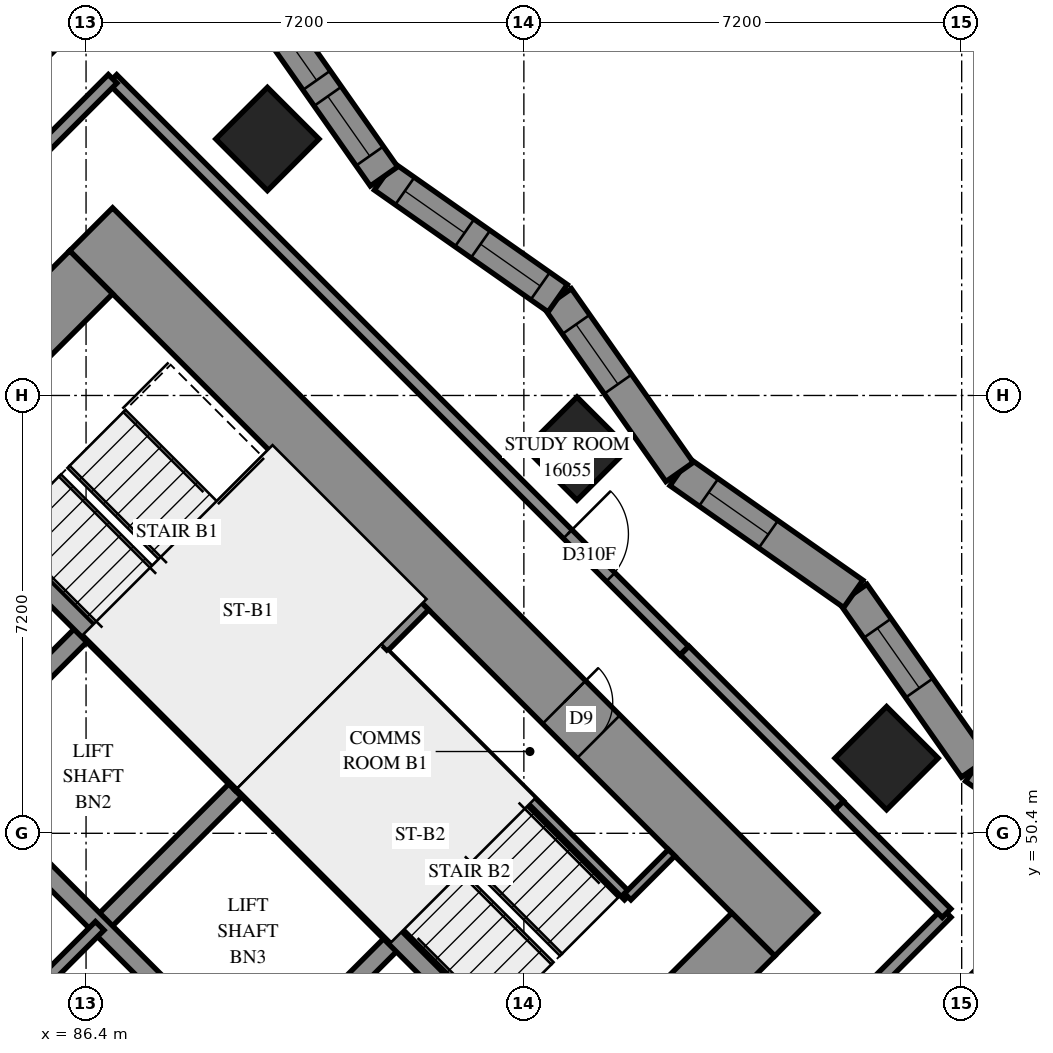
"""IFC4 building model, lengths in metres.
Left out: names, types, materials, properties, quantities, classifications, styles, units other than length and angle.
Written with IfcOpenShell. Run it as: python <this file> out.ifc"""

import sys

from ifc_helpers import new_model, si_unit, direction, frame, frame_2d, origin, origin_2d, place, context, subcontext, project, spatial, polyline, rectangle, outline, extrude, element, fill, save


model = new_model("IFC4")
c1 = context("Model", 3, precision=1e-05, world=origin(), true_north=direction((0.0, 1.0)))
c2 = subcontext(c1, "Body", "Model", "MODEL_VIEW")
j1 = project(units=[si_unit("LENGTHUNIT", "METRE"), si_unit("PLANEANGLEUNIT", "RADIAN")], contexts=[c1])
p1 = place(None, origin())
s1 = spatial("IfcSite", under=j1, at=p1, CompositionType="ELEMENT")
p2 = place(p1, origin())
s2 = spatial("IfcBuilding", under=s1, at=p2, CompositionType="ELEMENT")
p3 = place(p2, frame((0.0, 0.0, 61.0)))
s3 = spatial("IfcBuildingStorey", under=s2, at=p3, CompositionType="ELEMENT", Elevation=61.0)
for number, where, z_axis, x_axis in (
    (1, (89.382, 61.818, 0.0), (0.0, 0.0, 1.0), (0.707, -0.707, 0.0)),
    (2, (94.474, 56.727, 0.0), (0.0, 0.0, 1.0), (0.707, -0.707, 0.0)),
    (3, (99.565, 51.635, 0.0), (0.0, 0.0, 1.0), (0.707, -0.707, 0.0)),
):
    element("IfcColumn", number, at=place(p3, frame(where, z_axis=z_axis, x_axis=x_axis)), inside=s3, PredefinedType="COLUMN", context=c2, shape_type="SweptSolid", body=[
        extrude(rectangle(XDim=1.2, YDim=1.2, at=origin_2d()), origin(), (0.0, 0.0, 1.0), 3.1),
    ])
p4 = place(p3, frame((75.594, 49.443, -0.3), z_axis=(0.0, 0.0, 1.0), x_axis=(0.7071037324, -0.70710983, 0.0)))
e4 = element("IfcWall", 4, at=p4, inside=s3, PredefinedType="SHEAR", context=c2, shape_type="SweptSolid", body=[
    extrude(rectangle(XDim=16.4, YDim=1.0, at=frame_2d((8.2, 0.0))), origin(), (0.0, 0.0, 1.0), 2.7),
])
p5 = place(p3, frame((86.483, 60.333, -0.3), z_axis=(0.0, 0.0, 1.0), x_axis=(0.70710983, -0.7071037324, 0.0)))
e5 = element("IfcWall", 5, at=p5, inside=s3, PredefinedType="SHEAR", context=c2, shape_type="SweptSolid", body=[
    extrude(rectangle(XDim=16.4, YDim=1.0, at=frame_2d((8.2, 0.0))), origin(), (0.0, 0.0, 1.0), 2.7),
])
p6 = place(p5, frame((11.0, 0.0, 0.3)))
e6 = element("IfcOpeningElement", 6, at=p6, cuts=e5, PredefinedType="OPENING", context=c2, shape_type="SweptSolid", body=[
    extrude(rectangle(XDim=0.8, YDim=2.1, at=frame_2d((0.4, 1.05))), frame((0.0, 0.51, 0.0), z_axis=(0.0, -1.0, 0.0), x_axis=(1.0, 0.0, 0.0)), (0.0, 0.0, 1.0), 1.02),
])
p7 = place(p3, frame((76.301, 49.443, -0.3), z_axis=(0.0, 0.0, 1.0), x_axis=(0.7071067812, 0.7071067812, 0.0)))
e7 = element("IfcWall", 7, at=p7, inside=s3, PredefinedType="SHEAR", context=c2, shape_type="SweptSolid", body=[
    extrude(rectangle(XDim=14.4, YDim=1.0, at=frame_2d((7.2, 0.0))), origin(), (0.0, 0.0, 1.0), 2.7),
])
p8 = place(p7, frame((4.55, 0.0, 0.3)))
e8 = element("IfcOpeningElement", 8, at=p8, cuts=e7, PredefinedType="OPENING", context=c2, shape_type="SweptSolid", body=[
    extrude(rectangle(XDim=1.1, YDim=2.1, at=frame_2d((0.55, 1.05))), frame((0.0, 0.51, 0.0), z_axis=(0.0, -1.0, 0.0), x_axis=(1.0, 0.0, 0.0)), (0.0, 0.0, 1.0), 1.02),
])
p9 = place(p7, frame((11.35, 0.0, 0.3)))
e9 = element("IfcOpeningElement", 9, at=p9, cuts=e7, PredefinedType="OPENING", context=c2, shape_type="SweptSolid", body=[
    extrude(rectangle(XDim=1.1, YDim=2.1, at=frame_2d((0.55, 1.05))), frame((0.0, 0.51, 0.0), z_axis=(0.0, -1.0, 0.0), x_axis=(1.0, 0.0, 0.0)), (0.0, 0.0, 1.0), 1.02),
])
p10 = place(p3, frame((87.19, 38.554, -0.3), z_axis=(0.0, 0.0, 1.0), x_axis=(0.707103309, 0.7071102534, 0.0)))
e10 = element("IfcWall", 10, at=p10, inside=s3, PredefinedType="SHEAR", context=c2, shape_type="SweptSolid", body=[
    extrude(rectangle(XDim=14.4, YDim=1.0, at=frame_2d((7.2, 0.0))), origin(), (0.0, 0.0, 1.0), 2.7),
])
p11 = place(p10, frame((4.55, 0.0, 0.3)))
e11 = element("IfcOpeningElement", 11, at=p11, cuts=e10, PredefinedType="OPENING", context=c2, shape_type="SweptSolid", body=[
    extrude(rectangle(XDim=1.1, YDim=2.1, at=frame_2d((0.55, 1.05))), frame((0.0, 0.51, 0.0), z_axis=(0.0, -1.0, 0.0), x_axis=(1.0, 0.0, 0.0)), (0.0, 0.0, 1.0), 1.02),
])
p12 = place(p10, frame((11.35, 0.0, 0.3)))
e12 = element("IfcOpeningElement", 12, at=p12, cuts=e10, PredefinedType="OPENING", context=c2, shape_type="SweptSolid", body=[
    extrude(rectangle(XDim=1.1, YDim=2.1, at=frame_2d((0.55, 1.05))), frame((0.0, 0.51, 0.0), z_axis=(0.0, -1.0, 0.0), x_axis=(1.0, 0.0, 0.0)), (0.0, 0.0, 1.0), 1.02),
])
p13 = place(p3, frame((84.079, 51.423, 0.0), z_axis=(0.0, 0.0, 1.0), x_axis=(0.7071219326, 0.7070916295, 0.0)))
e13 = element("IfcWall", 13, at=p13, inside=s3, PredefinedType="SOLIDWALL", context=c2, shape_type="SweptSolid", body=[
    extrude(rectangle(XDim=3.3, YDim=0.3, at=frame_2d((1.65, 0.0))), origin(), (0.0, 0.0, 1.0), 3.1),
])
for number, where, z_axis, x_axis in (
    (14, (86.625, 48.878, 0.0), (0.0, 0.0, 1.0), (0.707, 0.707, 0.0)),
    (15, (89.17, 46.332, 0.0), (0.0, 0.0, 1.0), (0.707, 0.707, 0.0)),
):
    element("IfcWall", number, at=place(p3, frame(where, z_axis=z_axis, x_axis=x_axis)), inside=s3, PredefinedType="SOLIDWALL", context=c2, shape_type="SweptSolid", body=[
        extrude(rectangle(XDim=3.3, YDim=0.3, at=frame_2d((1.65, 0.0))), origin(), (0.0, 0.0, 1.0), 3.1),
    ])
p14 = place(p3, frame((78.988, 51.423, 0.0), z_axis=(0.0, 0.0, 1.0), x_axis=(0.7071067812, -0.7071067812, 0.0)))
e16 = element("IfcWall", 16, at=p14, inside=s3, PredefinedType="SOLIDWALL", context=c2, shape_type="SweptSolid", body=[
    extrude(rectangle(XDim=14.4, YDim=0.3, at=frame_2d((7.2, 0.0))), origin(), (0.0, 0.0, 1.0), 3.1),
])
p15 = place(p14, frame((1.25, 0.0, 0.0)))
e17 = element("IfcOpeningElement", 17, at=p15, cuts=e16, PredefinedType="OPENING", context=c2, shape_type="SweptSolid", body=[
    extrude(rectangle(XDim=1.1, YDim=2.1, at=frame_2d((0.55, 1.05))), frame((0.0, 0.16, 0.0), z_axis=(0.0, -1.0, 0.0), x_axis=(1.0, 0.0, 0.0)), (0.0, 0.0, 1.0), 0.32),
])
p16 = place(p14, frame((4.85, 0.0, 0.0)))
e18 = element("IfcOpeningElement", 18, at=p16, cuts=e16, PredefinedType="OPENING", context=c2, shape_type="SweptSolid", body=[
    extrude(rectangle(XDim=1.1, YDim=2.1, at=frame_2d((0.55, 1.05))), frame((0.0, 0.16, 0.0), z_axis=(0.0, -1.0, 0.0), x_axis=(1.0, 0.0, 0.0)), (0.0, 0.0, 1.0), 0.32),
])
p17 = place(p14, frame((8.45, 0.0, 0.0)))
e19 = element("IfcOpeningElement", 19, at=p17, cuts=e16, PredefinedType="OPENING", context=c2, shape_type="SweptSolid", body=[
    extrude(rectangle(XDim=1.1, YDim=2.1, at=frame_2d((0.55, 1.05))), frame((0.0, 0.16, 0.0), z_axis=(0.0, -1.0, 0.0), x_axis=(1.0, 0.0, 0.0)), (0.0, 0.0, 1.0), 0.32),
])
p18 = place(p14, frame((12.05, 0.0, 0.0)))
e20 = element("IfcOpeningElement", 20, at=p18, cuts=e16, PredefinedType="OPENING", context=c2, shape_type="SweptSolid", body=[
    extrude(rectangle(XDim=1.1, YDim=2.1, at=frame_2d((0.55, 1.05))), frame((0.0, 0.16, 0.0), z_axis=(0.0, -1.0, 0.0), x_axis=(1.0, 0.0, 0.0)), (0.0, 0.0, 1.0), 0.32),
])
p19 = place(p3, frame((81.534, 53.969, 0.0), z_axis=(0.0, 0.0, 1.0), x_axis=(0.707103309, -0.7071102534, 0.0)))
e21 = element("IfcWall", 21, at=p19, inside=s3, PredefinedType="SOLIDWALL", context=c2, shape_type="SweptSolid", body=[
    extrude(rectangle(XDim=14.4, YDim=0.3, at=frame_2d((7.2, 0.0))), origin(), (0.0, 0.0, 1.0), 3.1),
])
p20 = place(p19, frame((12.05, 0.0, 0.0)))
e22 = element("IfcOpeningElement", 22, at=p20, cuts=e21, PredefinedType="OPENING", context=c2, shape_type="SweptSolid", body=[
    extrude(rectangle(XDim=1.1, YDim=2.1, at=frame_2d((0.55, 1.05))), frame((0.0, 0.16, 0.0), z_axis=(0.0, -1.0, 0.0), x_axis=(1.0, 0.0, 0.0)), (0.0, 0.0, 1.0), 0.32),
])
for number, where, z_axis, x_axis in (
    (23, (83.867, 56.302, 0.0), (0.0, 0.0, 1.0), (0.707, -0.707, 0.0)),
    (24, (88.958, 51.211, 0.0), (0.0, 0.0, 1.0), (0.707, -0.707, 0.0)),
):
    element("IfcWall", number, at=place(p3, frame(where, z_axis=z_axis, x_axis=x_axis)), inside=s3, PredefinedType="SOLIDWALL", context=c2, shape_type="SweptSolid", body=[
        extrude(rectangle(XDim=7.2, YDim=0.3, at=frame_2d((3.6, 0.0))), origin(), (0.0, 0.0, 1.0), 3.1),
    ])
p21 = place(p3, frame((88.958, 51.211, 0.0), z_axis=(0.0, 0.0, 1.0), x_axis=(0.7071067812, 0.7071067812, 0.0)))
e25 = element("IfcWall", 25, at=p21, inside=s3, PredefinedType="SOLIDWALL", context=c2, shape_type="SweptSolid", body=[
    extrude(rectangle(XDim=4.2, YDim=0.3, at=frame_2d((2.1, 0.0))), origin(), (0.0, 0.0, 1.0), 3.1),
])
p22 = place(p3, frame((103.878, 49.477, 0.0), z_axis=(0.0, 0.0, 1.0), x_axis=(-0.8186472188, 0.5742967275, 0.0)))
e26 = element("IfcWall", 26, at=p22, inside=s3, PredefinedType="SOLIDWALL", context=c2, shape_type="SweptSolid", body=[
    extrude(outline(polyline([(-0.048, -0.275), (3.442, -0.275), (3.538, 0.275), (0.048, 0.275), (-0.048, -0.275)])), origin(), (0.0, 0.0, 1.0), 3.1),
])
p23 = place(p22, frame((1.541, 0.0, 0.5)))
e27 = element("IfcOpeningElement", 27, at=p23, cuts=e26, PredefinedType="OPENING", context=c2, shape_type="SweptSolid", body=[
    extrude(rectangle(XDim=1.2, YDim=2.45, at=frame_2d((0.6, 1.225))), frame((0.0, 0.285, 0.0), z_axis=(0.0, -1.0, 0.0), x_axis=(1.0, 0.0, 0.0)), (0.0, 0.0, 1.0), 0.57),
])
p24 = place(p3, frame((101.022, 51.481, 0.0), z_axis=(0.0, 0.0, 1.0), x_axis=(-0.5742967275, 0.8186472188, 0.0)))
e28 = element("IfcWall", 28, at=p24, inside=s3, PredefinedType="SOLIDWALL", context=c2, shape_type="SweptSolid", body=[
    extrude(outline(polyline([(0.048, -0.275), (3.538, -0.275), (3.442, 0.275), (-0.048, 0.275), (0.048, -0.275)])), origin(), (0.0, 0.0, 1.0), 3.1),
])
p25 = place(p24, frame((1.599, 0.0, 0.5)))
e29 = element("IfcOpeningElement", 29, at=p25, cuts=e28, PredefinedType="OPENING", context=c2, shape_type="SweptSolid", body=[
    extrude(rectangle(XDim=1.2, YDim=2.45, at=frame_2d((0.6, 1.225))), frame((0.0, 0.285, 0.0), z_axis=(0.0, -1.0, 0.0), x_axis=(1.0, 0.0, 0.0)), (0.0, 0.0, 1.0), 0.57),
])
p26 = place(p3, frame((99.017, 54.337, 0.0), z_axis=(0.0, 0.0, 1.0), x_axis=(-0.8186566697, 0.5742832552, 0.0)))
e30 = element("IfcWall", 30, at=p26, inside=s3, PredefinedType="SOLIDWALL", context=c2, shape_type="SweptSolid", body=[
    extrude(outline(polyline([(-0.048, -0.275), (3.442, -0.275), (3.538, 0.275), (0.048, 0.275), (-0.048, -0.275)])), origin(), (0.0, 0.0, 1.0), 3.1),
])
p27 = place(p26, frame((1.706, 0.0, 0.5)))
e31 = element("IfcOpeningElement", 31, at=p27, cuts=e30, PredefinedType="OPENING", context=c2, shape_type="SweptSolid", body=[
    extrude(rectangle(XDim=1.2, YDim=2.45, at=frame_2d((0.6, 1.225))), frame((0.0, 0.285, 0.0), z_axis=(0.0, -1.0, 0.0), x_axis=(1.0, 0.0, 0.0)), (0.0, 0.0, 1.0), 0.57),
])
p28 = place(p3, frame((96.161, 56.342, 0.0), z_axis=(0.0, 0.0, 1.0), x_axis=(-0.5742832552, 0.8186566697, 0.0)))
e32 = element("IfcWall", 32, at=p28, inside=s3, PredefinedType="SOLIDWALL", context=c2, shape_type="SweptSolid", body=[
    extrude(outline(polyline([(0.048, -0.275), (3.538, -0.275), (3.442, 0.275), (-0.048, 0.275), (0.048, -0.275)])), origin(), (0.0, 0.0, 1.0), 3.1),
])
p29 = place(p28, frame((1.764, 0.0, 0.5)))
e33 = element("IfcOpeningElement", 33, at=p29, cuts=e32, PredefinedType="OPENING", context=c2, shape_type="SweptSolid", body=[
    extrude(rectangle(XDim=1.2, YDim=2.45, at=frame_2d((0.6, 1.225))), frame((0.0, 0.285, 0.0), z_axis=(0.0, -1.0, 0.0), x_axis=(1.0, 0.0, 0.0)), (0.0, 0.0, 1.0), 0.57),
])
p30 = place(p3, frame((94.156, 59.199, 0.0), z_axis=(0.0, 0.0, 1.0), x_axis=(-0.8186472188, 0.5742967275, 0.0)))
e34 = element("IfcWall", 34, at=p30, inside=s3, PredefinedType="SOLIDWALL", context=c2, shape_type="SweptSolid", body=[
    extrude(outline(polyline([(-0.048, -0.275), (3.442, -0.275), (3.538, 0.275), (0.048, 0.275), (-0.048, -0.275)])), origin(), (0.0, 0.0, 1.0), 3.1),
])
p31 = place(p30, frame((0.35, 0.0, 0.5)))
e35 = element("IfcOpeningElement", 35, at=p31, cuts=e34, PredefinedType="OPENING", context=c2, shape_type="SweptSolid", body=[
    extrude(rectangle(XDim=1.2, YDim=2.45, at=frame_2d((0.6, 1.225))), frame((0.0, 0.285, 0.0), z_axis=(0.0, -1.0, 0.0), x_axis=(1.0, 0.0, 0.0)), (0.0, 0.0, 1.0), 0.57),
])
p32 = place(p30, frame((1.871, 0.0, 0.5)))
e36 = element("IfcOpeningElement", 36, at=p32, cuts=e34, PredefinedType="OPENING", context=c2, shape_type="SweptSolid", body=[
    extrude(rectangle(XDim=1.2, YDim=2.45, at=frame_2d((0.6, 1.225))), frame((0.0, 0.285, 0.0), z_axis=(0.0, -1.0, 0.0), x_axis=(1.0, 0.0, 0.0)), (0.0, 0.0, 1.0), 0.57),
])
p33 = place(p3, frame((91.3, 61.203, 0.0), z_axis=(0.0, 0.0, 1.0), x_axis=(-0.5742967275, 0.8186472188, 0.0)))
e37 = element("IfcWall", 37, at=p33, inside=s3, PredefinedType="SOLIDWALL", context=c2, shape_type="SweptSolid", body=[
    extrude(outline(polyline([(0.048, -0.275), (3.538, -0.275), (3.442, 0.275), (-0.048, 0.275), (0.048, -0.275)])), origin(), (0.0, 0.0, 1.0), 3.1),
])
p34 = place(p33, frame((0.409, 0.0, 0.5)))
e38 = element("IfcOpeningElement", 38, at=p34, cuts=e37, PredefinedType="OPENING", context=c2, shape_type="SweptSolid", body=[
    extrude(rectangle(XDim=1.2, YDim=2.45, at=frame_2d((0.6, 1.225))), frame((0.0, 0.285, 0.0), z_axis=(0.0, -1.0, 0.0), x_axis=(1.0, 0.0, 0.0)), (0.0, 0.0, 1.0), 0.57),
])
p35 = place(p33, frame((1.93, 0.0, 0.5)))
e39 = element("IfcOpeningElement", 39, at=p35, cuts=e37, PredefinedType="OPENING", context=c2, shape_type="SweptSolid", body=[
    extrude(rectangle(XDim=1.2, YDim=2.45, at=frame_2d((0.6, 1.225))), frame((0.0, 0.285, 0.0), z_axis=(0.0, -1.0, 0.0), x_axis=(1.0, 0.0, 0.0)), (0.0, 0.0, 1.0), 0.57),
])
p36 = place(p3, frame((91.313, 53.354, 0.0), z_axis=(0.0, 0.0, 1.0), x_axis=(0.7071067812, -0.7071067812, 0.0)))
e40 = element("IfcWall", 40, at=p36, inside=s3, PredefinedType="PARTITIONING", context=c2, shape_type="SweptSolid", body=[
    extrude(rectangle(XDim=5.65, YDim=0.15, at=frame_2d((2.825, 0.0))), origin(), (0.0, 0.0, 1.0), 3.1),
])
p37 = place(p3, frame((95.308, 49.358, 0.0), z_axis=(0.0, 0.0, 1.0), x_axis=(0.70705776, 0.707155799, 0.0)))
e41 = element("IfcWall", 41, at=p37, inside=s3, PredefinedType="PARTITIONING", context=c2, shape_type="SweptSolid", body=[
    extrude(rectangle(XDim=1.02, YDim=0.15, at=frame_2d((0.51, 0.0))), origin(), (0.0, 0.0, 1.0), 3.1),
])
p38 = place(p3, frame((84.079, 46.332, 0.0), z_axis=(0.0, 0.0, 1.0), x_axis=(0.7071067812, 0.7071067812, 0.0)))
e42 = element("IfcWall", 42, at=p38, inside=s3, PredefinedType="PARTITIONING", context=c2, shape_type="SweptSolid", body=[
    extrude(rectangle(XDim=3.6, YDim=0.2, at=frame_2d((1.8, 0.0))), origin(), (0.0, 0.0, 1.0), 3.1),
])
p39 = place(p3, frame((86.833, 62.805, 0.0), z_axis=(0.0, 0.0, 1.0), x_axis=(0.7072045138, -0.7070090351, 0.0)))
e43 = element("IfcWall", 43, at=p39, inside=s3, PredefinedType="PARTITIONING", context=c2, shape_type="SweptSolid", body=[
    extrude(rectangle(XDim=13.301, YDim=0.2, at=frame_2d((6.65, 0.0))), origin(), (0.0, 0.0, 1.0), 3.1),
])
p40 = place(p39, frame((10.586, 0.0, 0.0)))
e44 = element("IfcOpeningElement", 44, at=p40, cuts=e43, PredefinedType="OPENING", context=c2, shape_type="SweptSolid", body=[
    extrude(rectangle(XDim=1.0, YDim=2.1, at=frame_2d((0.5, 1.05))), frame((0.0, 0.11, 0.0), z_axis=(0.0, -1.0, 0.0), x_axis=(1.0, 0.0, 0.0)), (0.0, 0.0, 1.0), 0.22),
])
p41 = place(p3, frame((94.259, 41.243, 0.0), z_axis=(0.0, 0.0, 1.0), x_axis=(0.7070205168, 0.707193035, 0.0)))
e45 = element("IfcWall", 45, at=p41, inside=s3, PredefinedType="PARTITIONING", context=c2, shape_type="SweptSolid", body=[
    extrude(rectangle(XDim=12.173, YDim=0.2, at=frame_2d((6.086, 0.0))), origin(), (0.0, 0.0, 1.0), 3.1),
])
p42 = place(p3, frame((93.484, 42.02, 0.0), z_axis=(0.0, 0.0, 1.0), x_axis=(0.7071067812, 0.7071067812, 0.0)))
e46 = element("IfcWall", 46, at=p42, inside=s3, PredefinedType="PARTITIONING", context=c2, shape_type="SweptSolid", body=[
    extrude(rectangle(XDim=9.998, YDim=0.2, at=frame_2d((4.999, 0.0))), origin(), (0.0, 0.0, 1.0), 3.1),
])
p43 = place(p42, frame((0.148, 0.0, 0.0)))
e47 = element("IfcOpeningElement", 47, at=p43, cuts=e46, PredefinedType="OPENING", context=c2, shape_type="SweptSolid", body=[
    extrude(rectangle(XDim=1.0, YDim=2.1, at=frame_2d((0.5, 1.05))), frame((0.0, 0.11, 0.0), z_axis=(0.0, -1.0, 0.0), x_axis=(1.0, 0.0, 0.0)), (0.0, 0.0, 1.0), 0.22),
])
p44 = place(p3, frame((81.049, 58.577, 0.0), z_axis=(0.0, 0.0, 1.0), x_axis=(0.7071067812, 0.7071067812, 0.0)))
e48 = element("IfcWall", 48, at=p44, inside=s3, PredefinedType="PARTITIONING", context=c2, shape_type="SweptSolid", body=[
    extrude(rectangle(XDim=9.086, YDim=0.2, at=frame_2d((4.543, 0.0))), origin(), (0.0, 0.0, 1.0), 3.1),
])
p45 = place(p3, frame((81.053, 57.021, 0.0), z_axis=(0.0, 0.0, 1.0), x_axis=(0.7069845395, 0.7072290017, 0.0)))
e49 = element("IfcWall", 49, at=p45, inside=s3, PredefinedType="PARTITIONING", context=c2, shape_type="SweptSolid", body=[
    extrude(rectangle(XDim=8.181, YDim=0.2, at=frame_2d((4.091, 0.0))), origin(), (0.0, 0.0, 1.0), 3.1),
])
p46 = place(p45, frame((0.86, 0.0, 0.0)))
e50 = element("IfcOpeningElement", 50, at=p46, cuts=e49, PredefinedType="OPENING", context=c2, shape_type="SweptSolid", body=[
    extrude(rectangle(XDim=1.0, YDim=2.1, at=frame_2d((0.5, 1.05))), frame((0.0, 0.11, 0.0), z_axis=(0.0, -1.0, 0.0), x_axis=(1.0, 0.0, 0.0)), (0.0, 0.0, 1.0), 0.22),
])
p47 = place(p3, frame((96.244, 53.406, 0.0), z_axis=(0.0, 0.0, 1.0), x_axis=(0.7068288851, -0.7073845681, 0.0)))
e51 = element("IfcWall", 51, at=p47, inside=s3, PredefinedType="PARTITIONING", context=c2, shape_type="SweptSolid", body=[
    extrude(rectangle(XDim=3.599, YDim=0.2, at=frame_2d((1.8, 0.0))), origin(), (0.0, 0.0, 1.0), 3.1),
])
p48 = place(p3, frame((98.783, 50.855, 0.0), z_axis=(0.0, 0.0, 1.0), x_axis=(0.7071067812, -0.7071067812, 0.0)))
e52 = element("IfcWall", 52, at=p48, inside=s3, PredefinedType="PARTITIONING", context=c2, shape_type="SweptSolid", body=[
    extrude(rectangle(XDim=2.5, YDim=0.2, at=frame_2d((1.25, 0.0))), origin(), (0.0, 0.0, 1.0), 3.1),
])
p49 = place(p25, origin())
e53 = element("IfcWindow", 53, at=p49, inside=s3, PartitioningType="SINGLE_PANEL", PredefinedType="WINDOW", context=c2, shape_type="SweptSolid", body=[
    extrude(rectangle(XDim=1.2, YDim=2.45, at=frame_2d((0.6, 1.225))), frame((0.0, 0.155, 0.0), z_axis=(0.0, -1.0, 0.0), x_axis=(1.0, 0.0, 0.0)), (0.0, 0.0, 1.0), 0.06),
])
fill(e29, e53)
p50 = place(p27, origin())
e54 = element("IfcWindow", 54, at=p50, inside=s3, PartitioningType="SINGLE_PANEL", PredefinedType="WINDOW", context=c2, shape_type="SweptSolid", body=[
    extrude(rectangle(XDim=1.2, YDim=2.45, at=frame_2d((0.6, 1.225))), frame((0.0, 0.155, 0.0), z_axis=(0.0, -1.0, 0.0), x_axis=(1.0, 0.0, 0.0)), (0.0, 0.0, 1.0), 0.06),
])
fill(e31, e54)
p51 = place(p29, origin())
e55 = element("IfcWindow", 55, at=p51, inside=s3, PartitioningType="SINGLE_PANEL", PredefinedType="WINDOW", context=c2, shape_type="SweptSolid", body=[
    extrude(rectangle(XDim=1.2, YDim=2.45, at=frame_2d((0.6, 1.225))), frame((0.0, 0.155, 0.0), z_axis=(0.0, -1.0, 0.0), x_axis=(1.0, 0.0, 0.0)), (0.0, 0.0, 1.0), 0.06),
])
fill(e33, e55)
p52 = place(p31, origin())
e56 = element("IfcWindow", 56, at=p52, inside=s3, PartitioningType="SINGLE_PANEL", PredefinedType="WINDOW", context=c2, shape_type="SweptSolid", body=[
    extrude(rectangle(XDim=1.2, YDim=2.45, at=frame_2d((0.6, 1.225))), frame((0.0, 0.155, 0.0), z_axis=(0.0, -1.0, 0.0), x_axis=(1.0, 0.0, 0.0)), (0.0, 0.0, 1.0), 0.06),
])
fill(e35, e56)
p53 = place(p32, origin())
e57 = element("IfcWindow", 57, at=p53, inside=s3, PartitioningType="SINGLE_PANEL", PredefinedType="WINDOW", context=c2, shape_type="SweptSolid", body=[
    extrude(rectangle(XDim=1.2, YDim=2.45, at=frame_2d((0.6, 1.225))), frame((0.0, 0.155, 0.0), z_axis=(0.0, -1.0, 0.0), x_axis=(1.0, 0.0, 0.0)), (0.0, 0.0, 1.0), 0.06),
])
fill(e36, e57)
p54 = place(p34, origin())
e58 = element("IfcWindow", 58, at=p54, inside=s3, PartitioningType="SINGLE_PANEL", PredefinedType="WINDOW", context=c2, shape_type="SweptSolid", body=[
    extrude(rectangle(XDim=1.2, YDim=2.45, at=frame_2d((0.6, 1.225))), frame((0.0, 0.155, 0.0), z_axis=(0.0, -1.0, 0.0), x_axis=(1.0, 0.0, 0.0)), (0.0, 0.0, 1.0), 0.06),
])
fill(e38, e58)
p55 = place(p35, origin())
e59 = element("IfcWindow", 59, at=p55, inside=s3, PartitioningType="SINGLE_PANEL", PredefinedType="WINDOW", context=c2, shape_type="SweptSolid", body=[
    extrude(rectangle(XDim=1.2, YDim=2.45, at=frame_2d((0.6, 1.225))), frame((0.0, 0.155, 0.0), z_axis=(0.0, -1.0, 0.0), x_axis=(1.0, 0.0, 0.0)), (0.0, 0.0, 1.0), 0.06),
])
fill(e39, e59)
p56 = place(p6, origin())
e60 = element("IfcDoor", 60, at=p56, inside=s3, OperationType="SINGLE_SWING_RIGHT", PredefinedType="DOOR", context=c2, shape_type="SweptSolid", body=[
    extrude(rectangle(XDim=0.8, YDim=2.1, at=frame_2d((0.4, 1.05))), frame((0.0, -0.44, 0.0), z_axis=(0.0, -1.0, 0.0), x_axis=(1.0, 0.0, 0.0)), (0.0, 0.0, 1.0), 0.05),
])
fill(e6, e60)
p57 = place(p40, origin())
e61 = element("IfcDoor", 61, at=p57, inside=s3, OperationType="SINGLE_SWING_LEFT", PredefinedType="DOOR", context=c2, shape_type="SweptSolid", body=[
    extrude(rectangle(XDim=1.0, YDim=2.1, at=frame_2d((0.5, 1.05))), frame((0.0, 0.025, 0.0), z_axis=(0.0, -1.0, 0.0), x_axis=(1.0, 0.0, 0.0)), (0.0, 0.0, 1.0), 0.05),
])
fill(e44, e61)
save(model, sys.argv[1])
